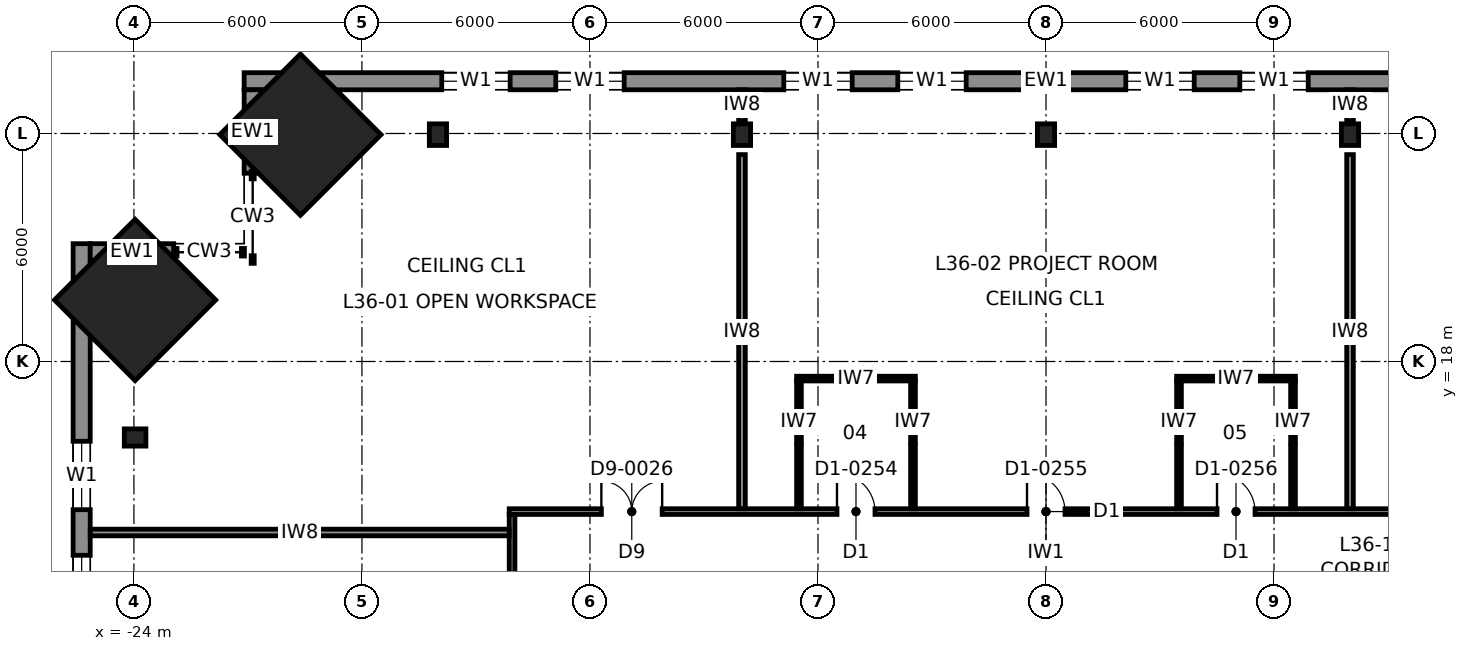
"""IFC4 building model, lengths in metres.
Left out: names, types, materials, properties, quantities, classifications, styles, units other than length and angle.
Written with IfcOpenShell. Run it as: python <this file> out.ifc"""

import sys

from ifc_helpers import new_model, si_unit, direction, frame, frame_2d, origin, origin_2d, place, context, subcontext, project, spatial, rectangle, i_section, extrude, element, fill, save


model = new_model("IFC4")
c1 = context("Model", 3, precision=1e-05, world=origin(), true_north=direction((0.0, 1.0)))
c2 = subcontext(c1, "Body", "Model", "MODEL_VIEW")
j1 = project(units=[si_unit("LENGTHUNIT", "METRE"), si_unit("PLANEANGLEUNIT", "RADIAN")], contexts=[c1])
p1 = place(None, origin())
s1 = spatial("IfcSite", under=j1, at=p1, CompositionType="ELEMENT")
p2 = place(p1, origin())
s2 = spatial("IfcBuilding", under=s1, at=p2, CompositionType="ELEMENT")
p3 = place(p2, frame((0.0, 0.0, 171.8)))
s3 = spatial("IfcBuildingStorey", under=s2, at=p3, CompositionType="ELEMENT", Elevation=171.8)
for number, where, z_axis, x_axis in (
    (1, (-23.969, 19.619, 0.0), (0.04, -0.04, 0.998), (0.708, 0.707, 0.0)),
    (2, (-19.619, 23.969, 0.0), (0.04, -0.04, 0.998), (0.707, 0.708, 0.0)),
):
    element("IfcColumn", number, at=place(p3, frame(where, z_axis=z_axis, x_axis=x_axis)), inside=s3, PredefinedType="COLUMN", context=c2, shape_type="SweptSolid", body=[
        extrude(rectangle(XDim=3.0, YDim=3.0, at=origin_2d()), origin(), (0.0, 0.0, 1.0), 4.007),
    ])
for number, where, z_axis, x_axis in (
    (3, (0.0, 23.969, 0.0), (0.0, -0.04, 0.999), (1.0, 0.0, 0.0)),
    (4, (8.0, 23.969, 0.0), (0.0, -0.04, 0.999), (1.0, 0.0, 0.0)),
    (5, (-8.0, 23.969, 0.0), (0.0, -0.04, 0.999), (1.0, 0.0, 0.0)),
    (6, (-16.0, 23.969, 0.0), (0.0, -0.04, 0.999), (1.0, 0.0, 0.0)),
    (7, (-23.969, 16.0, 0.0), (0.04, 0.0, 0.999), (0.0, 1.0, 0.0)),
):
    element("IfcColumn", number, at=place(p3, frame(where, z_axis=z_axis, x_axis=x_axis)), inside=s3, PredefinedType="COLUMN", context=c2, shape_type="SweptSolid", body=[
        extrude(i_section(OverallWidth=0.454, OverallDepth=0.569, WebThickness=0.078, FlangeThickness=0.125, at=origin_2d()), origin(), (0.0, 0.0, 1.0), 4.003),
    ])
p4 = place(p3, frame((21.1, 25.375, 0.0), z_axis=(0.0, 0.0, 1.0), x_axis=(-1.0, 0.0, 0.0)))
e8 = element("IfcWall", 8, at=p4, inside=s3, PredefinedType="SOLIDWALL", context=c2, shape_type="SweptSolid", body=[
    extrude(rectangle(XDim=42.2, YDim=0.45, at=frame_2d((21.1, 0.0))), origin(), (0.0, 0.0, 1.0), 3.83),
])
p5 = place(p4, frame((5.2, 0.0, 0.7)))
e9 = element("IfcOpeningElement", 9, at=p5, cuts=e8, PredefinedType="OPENING", context=c2, shape_type="SweptSolid", body=[
    extrude(rectangle(XDim=1.8, YDim=2.6, at=frame_2d((0.9, 1.3))), frame((0.0, 0.235, 0.0), z_axis=(0.0, -1.0, 0.0), x_axis=(1.0, 0.0, 0.0)), (0.0, 0.0, 1.0), 0.47),
])
p6 = place(p4, frame((8.2, 0.0, 0.7)))
e10 = element("IfcOpeningElement", 10, at=p6, cuts=e8, PredefinedType="OPENING", context=c2, shape_type="SweptSolid", body=[
    extrude(rectangle(XDim=1.8, YDim=2.6, at=frame_2d((0.9, 1.3))), frame((0.0, 0.235, 0.0), z_axis=(0.0, -1.0, 0.0), x_axis=(1.0, 0.0, 0.0)), (0.0, 0.0, 1.0), 0.47),
])
p7 = place(p4, frame((14.2, 0.0, 0.7)))
e11 = element("IfcOpeningElement", 11, at=p7, cuts=e8, PredefinedType="OPENING", context=c2, shape_type="SweptSolid", body=[
    extrude(rectangle(XDim=1.8, YDim=2.6, at=frame_2d((0.9, 1.3))), frame((0.0, 0.235, 0.0), z_axis=(0.0, -1.0, 0.0), x_axis=(1.0, 0.0, 0.0)), (0.0, 0.0, 1.0), 0.47),
])
p8 = place(p4, frame((17.2, 0.0, 0.7)))
e12 = element("IfcOpeningElement", 12, at=p8, cuts=e8, PredefinedType="OPENING", context=c2, shape_type="SweptSolid", body=[
    extrude(rectangle(XDim=1.8, YDim=2.6, at=frame_2d((0.9, 1.3))), frame((0.0, 0.235, 0.0), z_axis=(0.0, -1.0, 0.0), x_axis=(1.0, 0.0, 0.0)), (0.0, 0.0, 1.0), 0.47),
])
p9 = place(p4, frame((23.2, 0.0, 0.7)))
e13 = element("IfcOpeningElement", 13, at=p9, cuts=e8, PredefinedType="OPENING", context=c2, shape_type="SweptSolid", body=[
    extrude(rectangle(XDim=1.8, YDim=2.6, at=frame_2d((0.9, 1.3))), frame((0.0, 0.235, 0.0), z_axis=(0.0, -1.0, 0.0), x_axis=(1.0, 0.0, 0.0)), (0.0, 0.0, 1.0), 0.47),
])
p10 = place(p4, frame((26.2, 0.0, 0.7)))
e14 = element("IfcOpeningElement", 14, at=p10, cuts=e8, PredefinedType="OPENING", context=c2, shape_type="SweptSolid", body=[
    extrude(rectangle(XDim=1.8, YDim=2.6, at=frame_2d((0.9, 1.3))), frame((0.0, 0.235, 0.0), z_axis=(0.0, -1.0, 0.0), x_axis=(1.0, 0.0, 0.0)), (0.0, 0.0, 1.0), 0.47),
])
p11 = place(p4, frame((32.2, 0.0, 0.7)))
e15 = element("IfcOpeningElement", 15, at=p11, cuts=e8, PredefinedType="OPENING", context=c2, shape_type="SweptSolid", body=[
    extrude(rectangle(XDim=1.8, YDim=2.6, at=frame_2d((0.9, 1.3))), frame((0.0, 0.235, 0.0), z_axis=(0.0, -1.0, 0.0), x_axis=(1.0, 0.0, 0.0)), (0.0, 0.0, 1.0), 0.47),
])
p12 = place(p4, frame((35.2, 0.0, 0.7)))
e16 = element("IfcOpeningElement", 16, at=p12, cuts=e8, PredefinedType="OPENING", context=c2, shape_type="SweptSolid", body=[
    extrude(rectangle(XDim=1.8, YDim=2.6, at=frame_2d((0.9, 1.3))), frame((0.0, 0.235, 0.0), z_axis=(0.0, -1.0, 0.0), x_axis=(1.0, 0.0, 0.0)), (0.0, 0.0, 1.0), 0.47),
])
p13 = place(p3, frame((-25.375, 21.1, 0.0), z_axis=(0.0, 0.0, 1.0), x_axis=(0.0, -1.0, 0.0)))
e17 = element("IfcWall", 17, at=p13, inside=s3, PredefinedType="SOLIDWALL", context=c2, shape_type="SweptSolid", body=[
    extrude(rectangle(XDim=42.2, YDim=0.45, at=frame_2d((21.1, 0.0))), origin(), (0.0, 0.0, 1.0), 3.83),
])
p14 = place(p13, frame((5.2, 0.0, 0.7)))
e18 = element("IfcOpeningElement", 18, at=p14, cuts=e17, PredefinedType="OPENING", context=c2, shape_type="SweptSolid", body=[
    extrude(rectangle(XDim=1.8, YDim=2.6, at=frame_2d((0.9, 1.3))), frame((0.0, 0.235, 0.0), z_axis=(0.0, -1.0, 0.0), x_axis=(1.0, 0.0, 0.0)), (0.0, 0.0, 1.0), 0.47),
])
p15 = place(p13, frame((8.2, 0.0, 0.7)))
e19 = element("IfcOpeningElement", 19, at=p15, cuts=e17, PredefinedType="OPENING", context=c2, shape_type="SweptSolid", body=[
    extrude(rectangle(XDim=1.8, YDim=2.6, at=frame_2d((0.9, 1.3))), frame((0.0, 0.235, 0.0), z_axis=(0.0, -1.0, 0.0), x_axis=(1.0, 0.0, 0.0)), (0.0, 0.0, 1.0), 0.47),
])
p16 = place(p13, frame((14.2, 0.0, 0.7)))
e20 = element("IfcOpeningElement", 20, at=p16, cuts=e17, PredefinedType="OPENING", context=c2, shape_type="SweptSolid", body=[
    extrude(rectangle(XDim=1.8, YDim=2.6, at=frame_2d((0.9, 1.3))), frame((0.0, 0.235, 0.0), z_axis=(0.0, -1.0, 0.0), x_axis=(1.0, 0.0, 0.0)), (0.0, 0.0, 1.0), 0.47),
])
p17 = place(p13, frame((17.2, 0.0, 0.7)))
e21 = element("IfcOpeningElement", 21, at=p17, cuts=e17, PredefinedType="OPENING", context=c2, shape_type="SweptSolid", body=[
    extrude(rectangle(XDim=1.8, YDim=2.6, at=frame_2d((0.9, 1.3))), frame((0.0, 0.235, 0.0), z_axis=(0.0, -1.0, 0.0), x_axis=(1.0, 0.0, 0.0)), (0.0, 0.0, 1.0), 0.47),
])
p18 = place(p13, frame((23.2, 0.0, 0.7)))
e22 = element("IfcOpeningElement", 22, at=p18, cuts=e17, PredefinedType="OPENING", context=c2, shape_type="SweptSolid", body=[
    extrude(rectangle(XDim=1.8, YDim=2.6, at=frame_2d((0.9, 1.3))), frame((0.0, 0.235, 0.0), z_axis=(0.0, -1.0, 0.0), x_axis=(1.0, 0.0, 0.0)), (0.0, 0.0, 1.0), 0.47),
])
p19 = place(p13, frame((26.2, 0.0, 0.7)))
e23 = element("IfcOpeningElement", 23, at=p19, cuts=e17, PredefinedType="OPENING", context=c2, shape_type="SweptSolid", body=[
    extrude(rectangle(XDim=1.8, YDim=2.6, at=frame_2d((0.9, 1.3))), frame((0.0, 0.235, 0.0), z_axis=(0.0, -1.0, 0.0), x_axis=(1.0, 0.0, 0.0)), (0.0, 0.0, 1.0), 0.47),
])
p20 = place(p13, frame((32.2, 0.0, 0.7)))
e24 = element("IfcOpeningElement", 24, at=p20, cuts=e17, PredefinedType="OPENING", context=c2, shape_type="SweptSolid", body=[
    extrude(rectangle(XDim=1.8, YDim=2.6, at=frame_2d((0.9, 1.3))), frame((0.0, 0.235, 0.0), z_axis=(0.0, -1.0, 0.0), x_axis=(1.0, 0.0, 0.0)), (0.0, 0.0, 1.0), 0.47),
])
p21 = place(p13, frame((35.2, 0.0, 0.7)))
e25 = element("IfcOpeningElement", 25, at=p21, cuts=e17, PredefinedType="OPENING", context=c2, shape_type="SweptSolid", body=[
    extrude(rectangle(XDim=1.8, YDim=2.6, at=frame_2d((0.9, 1.3))), frame((0.0, 0.235, 0.0), z_axis=(0.0, -1.0, 0.0), x_axis=(1.0, 0.0, 0.0)), (0.0, 0.0, 1.0), 0.47),
])
for number, where, z_axis, x_axis in (
    (26, (-20.875, 22.954, 0.0), (0.0, 0.0, 1.0), (0.0, 1.0, 0.0)),
    (27, (-22.954, 20.875, 0.0), (0.0, 0.0, 1.0), (-1.0, 0.0, 0.0)),
):
    element("IfcWall", number, at=place(p3, frame(where, z_axis=z_axis, x_axis=x_axis)), inside=s3, PredefinedType="SOLIDWALL", context=c2, shape_type="SweptSolid", body=[
        extrude(rectangle(XDim=2.196, YDim=0.45, at=frame_2d((1.098, 0.0))), origin(), (0.0, 0.0, 1.0), 3.83),
    ])
p22 = place(p3, frame((-14.125, 14.05, 0.0), z_axis=(0.0, 0.0, 1.0), x_axis=(1.0, 0.0, 0.0)))
e28 = element("IfcWall", 28, at=p22, inside=s3, PredefinedType="PARTITIONING", context=c2, shape_type="SweptSolid", body=[
    extrude(rectangle(XDim=28.25, YDim=0.15, at=frame_2d((14.125, 0.0))), origin(), (0.0, 0.0, 1.0), 3.83),
])
p23 = place(p22, frame((2.425, 0.0, 0.0)))
e29 = element("IfcOpeningElement", 29, at=p23, cuts=e28, PredefinedType="OPENING", context=c2, shape_type="SweptSolid", body=[
    extrude(rectangle(XDim=1.6, YDim=2.3, at=frame_2d((0.8, 1.15))), frame((0.0, 0.085, 0.0), z_axis=(0.0, -1.0, 0.0), x_axis=(1.0, 0.0, 0.0)), (0.0, 0.0, 1.0), 0.17),
])
p24 = place(p22, frame((13.625, 0.0, 0.0)))
e30 = element("IfcOpeningElement", 30, at=p24, cuts=e28, PredefinedType="OPENING", context=c2, shape_type="SweptSolid", body=[
    extrude(rectangle(XDim=1.0, YDim=2.3, at=frame_2d((0.5, 1.15))), frame((0.0, 0.085, 0.0), z_axis=(0.0, -1.0, 0.0), x_axis=(1.0, 0.0, 0.0)), (0.0, 0.0, 1.0), 0.17),
])
p25 = place(p22, frame((24.225, 0.0, 0.0)))
e31 = element("IfcOpeningElement", 31, at=p25, cuts=e28, PredefinedType="OPENING", context=c2, shape_type="SweptSolid", body=[
    extrude(rectangle(XDim=1.6, YDim=2.3, at=frame_2d((0.8, 1.15))), frame((0.0, 0.085, 0.0), z_axis=(0.0, -1.0, 0.0), x_axis=(1.0, 0.0, 0.0)), (0.0, 0.0, 1.0), 0.17),
])
p26 = place(p22, frame((8.625, 0.0, 0.0)))
e32 = element("IfcOpeningElement", 32, at=p26, cuts=e28, PredefinedType="OPENING", context=c2, shape_type="SweptSolid", body=[
    extrude(rectangle(XDim=1.0, YDim=2.3, at=frame_2d((0.5, 1.15))), frame((0.0, 0.085, 0.0), z_axis=(0.0, -1.0, 0.0), x_axis=(1.0, 0.0, 0.0)), (0.0, 0.0, 1.0), 0.17),
])
p27 = place(p22, frame((18.625, 0.0, 0.0)))
e33 = element("IfcOpeningElement", 33, at=p27, cuts=e28, PredefinedType="OPENING", context=c2, shape_type="SweptSolid", body=[
    extrude(rectangle(XDim=1.0, YDim=2.3, at=frame_2d((0.5, 1.15))), frame((0.0, 0.085, 0.0), z_axis=(0.0, -1.0, 0.0), x_axis=(1.0, 0.0, 0.0)), (0.0, 0.0, 1.0), 0.17),
])
p28 = place(p3, frame((-14.05, 13.975, 0.0), z_axis=(0.0, 0.0, 1.0), x_axis=(0.0, -1.0, 0.0)))
e34 = element("IfcWall", 34, at=p28, inside=s3, PredefinedType="PARTITIONING", context=c2, shape_type="SweptSolid", body=[
    extrude(rectangle(XDim=27.55, YDim=0.15, at=frame_2d((13.775, 0.0))), origin(), (0.0, 0.0, 1.0), 3.83),
])
p29 = place(p28, frame((22.025, 0.0, 0.0)))
e35 = element("IfcOpeningElement", 35, at=p29, cuts=e34, PredefinedType="OPENING", context=c2, shape_type="SweptSolid", body=[
    extrude(rectangle(XDim=1.6, YDim=2.3, at=frame_2d((0.8, 1.15))), frame((0.0, 0.085, 0.0), z_axis=(0.0, -1.0, 0.0), x_axis=(1.0, 0.0, 0.0)), (0.0, 0.0, 1.0), 0.17),
])
p30 = place(p28, frame((2.825, 0.0, 0.0)))
e36 = element("IfcOpeningElement", 36, at=p30, cuts=e34, PredefinedType="OPENING", context=c2, shape_type="SweptSolid", body=[
    extrude(rectangle(XDim=1.0, YDim=2.3, at=frame_2d((0.5, 1.15))), frame((0.0, 0.085, 0.0), z_axis=(0.0, -1.0, 0.0), x_axis=(1.0, 0.0, 0.0)), (0.0, 0.0, 1.0), 0.17),
])
p31 = place(p28, frame((17.975, 0.0, 0.0)))
e37 = element("IfcOpeningElement", 37, at=p31, cuts=e34, PredefinedType="OPENING", context=c2, shape_type="SweptSolid", body=[
    extrude(rectangle(XDim=1.0, YDim=2.3, at=frame_2d((0.5, 1.15))), frame((0.0, 0.085, 0.0), z_axis=(0.0, -1.0, 0.0), x_axis=(1.0, 0.0, 0.0)), (0.0, 0.0, 1.0), 0.17),
])
p32 = place(p28, frame((9.975, 0.0, 0.0)))
e38 = element("IfcOpeningElement", 38, at=p32, cuts=e34, PredefinedType="OPENING", context=c2, shape_type="SweptSolid", body=[
    extrude(rectangle(XDim=1.0, YDim=2.3, at=frame_2d((0.5, 1.15))), frame((0.0, 0.085, 0.0), z_axis=(0.0, -1.0, 0.0), x_axis=(1.0, 0.0, 0.0)), (0.0, 0.0, 1.0), 0.17),
])
p33 = place(p3, frame((-25.15, 13.5, 0.0), z_axis=(0.0, 0.0, 1.0), x_axis=(1.0, 0.0, 0.0)))
e39 = element("IfcWall", 39, at=p33, inside=s3, PredefinedType="PARTITIONING", context=c2, shape_type="SweptSolid", body=[
    extrude(rectangle(XDim=11.025, YDim=0.175, at=frame_2d((5.512, 0.0))), origin(), (0.0, 0.0, 1.0), 3.83),
])
p34 = place(p3, frame((-8.0, 14.125, 0.0), z_axis=(0.0, 0.0, 1.0), x_axis=(0.0, 1.0, 0.0)))
e40 = element("IfcWall", 40, at=p34, inside=s3, PredefinedType="PARTITIONING", context=c2, shape_type="SweptSolid", body=[
    extrude(rectangle(XDim=9.319, YDim=0.175, at=frame_2d((4.66, 0.0))), origin(), (0.0, 0.0, 1.0), 2.84),
])
p35 = place(p3, frame((-8.0, 24.333, 0.0), z_axis=(0.0, 0.0, 1.0), x_axis=(0.0, 1.0, 0.0)))
e41 = element("IfcWall", 41, at=p35, inside=s3, PredefinedType="PARTITIONING", context=c2, shape_type="SweptSolid", body=[
    extrude(rectangle(XDim=0.817, YDim=0.175, at=frame_2d((0.408, 0.0))), origin(), (0.0, 0.0, 1.0), 3.83),
])
p36 = place(p3, frame((8.0, 14.125, 0.0), z_axis=(0.0, 0.0, 1.0), x_axis=(0.0, 1.0, 0.0)))
e42 = element("IfcWall", 42, at=p36, inside=s3, PredefinedType="PARTITIONING", context=c2, shape_type="SweptSolid", body=[
    extrude(rectangle(XDim=9.319, YDim=0.175, at=frame_2d((4.66, 0.0))), origin(), (0.0, 0.0, 1.0), 2.84),
])
p37 = place(p3, frame((8.0, 24.333, 0.0), z_axis=(0.0, 0.0, 1.0), x_axis=(0.0, 1.0, 0.0)))
e43 = element("IfcWall", 43, at=p37, inside=s3, PredefinedType="PARTITIONING", context=c2, shape_type="SweptSolid", body=[
    extrude(rectangle(XDim=0.817, YDim=0.175, at=frame_2d((0.408, 0.0))), origin(), (0.0, 0.0, 1.0), 3.83),
])
p38 = place(p3, frame((-6.562, 17.55, 0.0), z_axis=(0.0, 0.0, 1.0), x_axis=(1.0, 0.0, 0.0)))
e44 = element("IfcWall", 44, at=p38, inside=s3, PredefinedType="PARTITIONING", context=c2, shape_type="SweptSolid", body=[
    extrude(rectangle(XDim=3.125, YDim=0.125, at=frame_2d((1.562, 0.0))), origin(), (0.0, 0.0, 1.0), 3.83),
])
for number, where, z_axis, x_axis in (
    (45, (-6.5, 14.125, 0.0), (0.0, 0.0, 1.0), (0.0, 1.0, 0.0)),
    (46, (-3.5, 14.125, 0.0), (0.0, 0.0, 1.0), (0.0, 1.0, 0.0)),
):
    element("IfcWall", number, at=place(p3, frame(where, z_axis=z_axis, x_axis=x_axis)), inside=s3, PredefinedType="PARTITIONING", context=c2, shape_type="SweptSolid", body=[
        extrude(rectangle(XDim=3.363, YDim=0.125, at=frame_2d((1.681, 0.0))), origin(), (0.0, 0.0, 1.0), 3.83),
    ])
p39 = place(p3, frame((3.438, 17.55, 0.0), z_axis=(0.0, 0.0, 1.0), x_axis=(1.0, 0.0, 0.0)))
e47 = element("IfcWall", 47, at=p39, inside=s3, PredefinedType="PARTITIONING", context=c2, shape_type="SweptSolid", body=[
    extrude(rectangle(XDim=3.125, YDim=0.125, at=frame_2d((1.562, 0.0))), origin(), (0.0, 0.0, 1.0), 3.83),
])
for number, where, z_axis, x_axis in (
    (48, (3.5, 14.125, 0.0), (0.0, 0.0, 1.0), (0.0, 1.0, 0.0)),
    (49, (6.5, 14.125, 0.0), (0.0, 0.0, 1.0), (0.0, 1.0, 0.0)),
):
    element("IfcWall", number, at=place(p3, frame(where, z_axis=z_axis, x_axis=x_axis)), inside=s3, PredefinedType="PARTITIONING", context=c2, shape_type="SweptSolid", body=[
        extrude(rectangle(XDim=3.363, YDim=0.125, at=frame_2d((1.681, 0.0))), origin(), (0.0, 0.0, 1.0), 3.83),
    ])
p40 = place(p7, origin())
e50 = element("IfcWindow", 50, at=p40, inside=s3, PartitioningType="SINGLE_PANEL", PredefinedType="WINDOW", context=c2, shape_type="SweptSolid", body=[
    extrude(rectangle(XDim=1.8, YDim=2.6, at=frame_2d((0.9, 1.3))), frame((0.0, 0.03, 0.0), z_axis=(0.0, -1.0, 0.0), x_axis=(1.0, 0.0, 0.0)), (0.0, 0.0, 1.0), 0.06),
])
fill(e11, e50)
p41 = place(p8, origin())
e51 = element("IfcWindow", 51, at=p41, inside=s3, PartitioningType="SINGLE_PANEL", PredefinedType="WINDOW", context=c2, shape_type="SweptSolid", body=[
    extrude(rectangle(XDim=1.8, YDim=2.6, at=frame_2d((0.9, 1.3))), frame((0.0, 0.03, 0.0), z_axis=(0.0, -1.0, 0.0), x_axis=(1.0, 0.0, 0.0)), (0.0, 0.0, 1.0), 0.06),
])
fill(e12, e51)
p42 = place(p9, origin())
e52 = element("IfcWindow", 52, at=p42, inside=s3, PartitioningType="SINGLE_PANEL", PredefinedType="WINDOW", context=c2, shape_type="SweptSolid", body=[
    extrude(rectangle(XDim=1.8, YDim=2.6, at=frame_2d((0.9, 1.3))), frame((0.0, 0.03, 0.0), z_axis=(0.0, -1.0, 0.0), x_axis=(1.0, 0.0, 0.0)), (0.0, 0.0, 1.0), 0.06),
])
fill(e13, e52)
p43 = place(p10, origin())
e53 = element("IfcWindow", 53, at=p43, inside=s3, PartitioningType="SINGLE_PANEL", PredefinedType="WINDOW", context=c2, shape_type="SweptSolid", body=[
    extrude(rectangle(XDim=1.8, YDim=2.6, at=frame_2d((0.9, 1.3))), frame((0.0, 0.03, 0.0), z_axis=(0.0, -1.0, 0.0), x_axis=(1.0, 0.0, 0.0)), (0.0, 0.0, 1.0), 0.06),
])
fill(e14, e53)
p44 = place(p11, origin())
e54 = element("IfcWindow", 54, at=p44, inside=s3, PartitioningType="SINGLE_PANEL", PredefinedType="WINDOW", context=c2, shape_type="SweptSolid", body=[
    extrude(rectangle(XDim=1.8, YDim=2.6, at=frame_2d((0.9, 1.3))), frame((0.0, 0.03, 0.0), z_axis=(0.0, -1.0, 0.0), x_axis=(1.0, 0.0, 0.0)), (0.0, 0.0, 1.0), 0.06),
])
fill(e15, e54)
p45 = place(p12, origin())
e55 = element("IfcWindow", 55, at=p45, inside=s3, PartitioningType="SINGLE_PANEL", PredefinedType="WINDOW", context=c2, shape_type="SweptSolid", body=[
    extrude(rectangle(XDim=1.8, YDim=2.6, at=frame_2d((0.9, 1.3))), frame((0.0, 0.03, 0.0), z_axis=(0.0, -1.0, 0.0), x_axis=(1.0, 0.0, 0.0)), (0.0, 0.0, 1.0), 0.06),
])
fill(e16, e55)
p46 = place(p14, origin())
e56 = element("IfcWindow", 56, at=p46, inside=s3, PartitioningType="SINGLE_PANEL", PredefinedType="WINDOW", context=c2, shape_type="SweptSolid", body=[
    extrude(rectangle(XDim=1.8, YDim=2.6, at=frame_2d((0.9, 1.3))), frame((0.0, 0.03, 0.0), z_axis=(0.0, -1.0, 0.0), x_axis=(1.0, 0.0, 0.0)), (0.0, 0.0, 1.0), 0.06),
])
fill(e18, e56)
p47 = place(p15, origin())
e57 = element("IfcWindow", 57, at=p47, inside=s3, PartitioningType="SINGLE_PANEL", PredefinedType="WINDOW", context=c2, shape_type="SweptSolid", body=[
    extrude(rectangle(XDim=1.8, YDim=2.6, at=frame_2d((0.9, 1.3))), frame((0.0, 0.03, 0.0), z_axis=(0.0, -1.0, 0.0), x_axis=(1.0, 0.0, 0.0)), (0.0, 0.0, 1.0), 0.06),
])
fill(e19, e57)
p48 = place(p23, origin())
e58 = element("IfcDoor", 58, at=p48, inside=s3, OperationType="DOUBLE_DOOR_SINGLE_SWING", PredefinedType="DOOR", context=c2, shape_type="SweptSolid", body=[
    extrude(rectangle(XDim=1.6, YDim=2.3, at=frame_2d((0.8, 1.15))), frame((0.0, 0.025, 0.0), z_axis=(0.0, -1.0, 0.0), x_axis=(1.0, 0.0, 0.0)), (0.0, 0.0, 1.0), 0.05),
])
fill(e29, e58)
p49 = place(p24, origin())
e59 = element("IfcDoor", 59, at=p49, inside=s3, OperationType="SINGLE_SWING_LEFT", PredefinedType="DOOR", context=c2, shape_type="SweptSolid", body=[
    extrude(rectangle(XDim=1.0, YDim=2.3, at=frame_2d((0.5, 1.15))), frame((0.0, 0.025, 0.0), z_axis=(0.0, -1.0, 0.0), x_axis=(1.0, 0.0, 0.0)), (0.0, 0.0, 1.0), 0.05),
])
fill(e30, e59)
p50 = place(p26, origin())
e60 = element("IfcDoor", 60, at=p50, inside=s3, OperationType="SINGLE_SWING_LEFT", PredefinedType="DOOR", context=c2, shape_type="SweptSolid", body=[
    extrude(rectangle(XDim=1.0, YDim=2.3, at=frame_2d((0.5, 1.15))), frame((0.0, 0.025, 0.0), z_axis=(0.0, -1.0, 0.0), x_axis=(1.0, 0.0, 0.0)), (0.0, 0.0, 1.0), 0.05),
])
fill(e32, e60)
p51 = place(p27, origin())
e61 = element("IfcDoor", 61, at=p51, inside=s3, OperationType="SINGLE_SWING_LEFT", PredefinedType="DOOR", context=c2, shape_type="SweptSolid", body=[
    extrude(rectangle(XDim=1.0, YDim=2.3, at=frame_2d((0.5, 1.15))), frame((0.0, 0.025, 0.0), z_axis=(0.0, -1.0, 0.0), x_axis=(1.0, 0.0, 0.0)), (0.0, 0.0, 1.0), 0.05),
])
fill(e33, e61)
save(model, sys.argv[1])
